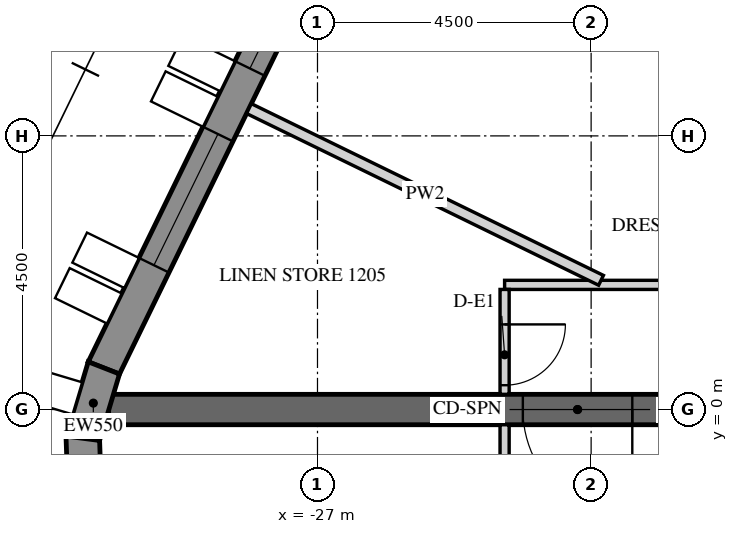
"""IFC4 building model, lengths in metres.
Left out: names, types, materials, properties, quantities, classifications, styles, units other than length and angle.
Written with IfcOpenShell. Run it as: python <this file> out.ifc"""

import sys

from ifc_helpers import new_model, si_unit, direction, frame, frame_2d, origin, place, context, subcontext, project, spatial, polyline, rectangle, outline, extrude, element, fill, save


model = new_model("IFC4")
c1 = context("Model", 3, precision=1e-05, world=origin(), true_north=direction((0.0, 1.0)))
c2 = subcontext(c1, "Body", "Model", "MODEL_VIEW")
j1 = project(units=[si_unit("LENGTHUNIT", "METRE"), si_unit("PLANEANGLEUNIT", "RADIAN")], contexts=[c1])
p1 = place(None, origin())
s1 = spatial("IfcSite", under=j1, at=p1, CompositionType="ELEMENT")
p2 = place(p1, origin())
s2 = spatial("IfcBuilding", under=s1, at=p2, CompositionType="ELEMENT")
p3 = place(p2, frame((0.0, 0.0, 164.4)))
s3 = spatial("IfcBuildingStorey", under=s2, at=p3, CompositionType="ELEMENT", Elevation=164.4)
p4 = place(p3, frame((-18.345, 25.633, -0.15), z_axis=(0.0, 0.0, 1.0), x_axis=(-0.43837181828, -0.898793718791, 0.0)))
e1 = element("IfcWall", 1, at=p4, inside=s3, PredefinedType="SOLIDWALL", context=c2, shape_type="SweptSolid", body=[
    extrude(outline(polyline([(-0.026, -0.275), (27.78, -0.275), (27.735, 0.275), (0.026, 0.275), (-0.026, -0.275)])), origin(), (0.0, 0.0, 1.0), 3.9),
])
p5 = place(p4, frame((1.879, 0.0, 1.05)))
e2 = element("IfcOpeningElement", 2, at=p5, cuts=e1, PredefinedType="OPENING", context=c2, shape_type="SweptSolid", body=[
    extrude(rectangle(XDim=2.4, YDim=2.4, at=frame_2d((1.2, 1.2))), frame((0.0, 0.285, 0.0), z_axis=(0.0, -1.0, 0.0), x_axis=(1.0, 0.0, 0.0)), (0.0, 0.0, 1.0), 0.57),
])
p6 = place(p4, frame((5.479, 0.0, 1.05)))
e3 = element("IfcOpeningElement", 3, at=p6, cuts=e1, PredefinedType="OPENING", context=c2, shape_type="SweptSolid", body=[
    extrude(rectangle(XDim=2.4, YDim=2.4, at=frame_2d((1.2, 1.2))), frame((0.0, 0.285, 0.0), z_axis=(0.0, -1.0, 0.0), x_axis=(1.0, 0.0, 0.0)), (0.0, 0.0, 1.0), 0.57),
])
p7 = place(p4, frame((9.079, 0.0, 1.05)))
e4 = element("IfcOpeningElement", 4, at=p7, cuts=e1, PredefinedType="OPENING", context=c2, shape_type="SweptSolid", body=[
    extrude(rectangle(XDim=2.4, YDim=2.4, at=frame_2d((1.2, 1.2))), frame((0.0, 0.285, 0.0), z_axis=(0.0, -1.0, 0.0), x_axis=(1.0, 0.0, 0.0)), (0.0, 0.0, 1.0), 0.57),
])
p8 = place(p4, frame((12.679, 0.0, 1.05)))
e5 = element("IfcOpeningElement", 5, at=p8, cuts=e1, PredefinedType="OPENING", context=c2, shape_type="SweptSolid", body=[
    extrude(rectangle(XDim=2.4, YDim=2.4, at=frame_2d((1.2, 1.2))), frame((0.0, 0.285, 0.0), z_axis=(0.0, -1.0, 0.0), x_axis=(1.0, 0.0, 0.0)), (0.0, 0.0, 1.0), 0.57),
])
p9 = place(p4, frame((16.279, 0.0, 1.05)))
e6 = element("IfcOpeningElement", 6, at=p9, cuts=e1, PredefinedType="OPENING", context=c2, shape_type="SweptSolid", body=[
    extrude(rectangle(XDim=2.4, YDim=2.4, at=frame_2d((1.2, 1.2))), frame((0.0, 0.285, 0.0), z_axis=(0.0, -1.0, 0.0), x_axis=(1.0, 0.0, 0.0)), (0.0, 0.0, 1.0), 0.57),
])
p10 = place(p4, frame((19.879, 0.0, 1.05)))
e7 = element("IfcOpeningElement", 7, at=p10, cuts=e1, PredefinedType="OPENING", context=c2, shape_type="SweptSolid", body=[
    extrude(rectangle(XDim=2.4, YDim=2.4, at=frame_2d((1.2, 1.2))), frame((0.0, 0.285, 0.0), z_axis=(0.0, -1.0, 0.0), x_axis=(1.0, 0.0, 0.0)), (0.0, 0.0, 1.0), 0.57),
])
p11 = place(p4, frame((23.479, 0.0, 1.05)))
e8 = element("IfcOpeningElement", 8, at=p11, cuts=e1, PredefinedType="OPENING", context=c2, shape_type="SweptSolid", body=[
    extrude(rectangle(XDim=2.4, YDim=2.4, at=frame_2d((1.2, 1.2))), frame((0.0, 0.285, 0.0), z_axis=(0.0, -1.0, 0.0), x_axis=(1.0, 0.0, 0.0)), (0.0, 0.0, 1.0), 0.57),
])
p12 = place(p3, frame((-30.513, 0.684, -0.15), z_axis=(0.0, 0.0, 1.0), x_axis=(-0.286736058109, -0.958009620505, 0.0)))
e9 = element("IfcWall", 9, at=p12, inside=s3, PredefinedType="SOLIDWALL", context=c2, shape_type="SweptSolid", body=[
    extrude(outline(polyline([(-0.022, -0.275), (1.253, -0.275), (1.163, 0.275), (0.022, 0.275), (-0.022, -0.275)])), origin(), (0.0, 0.0, 1.0), 3.9),
])
p13 = place(p3, frame((-30.86, -0.473, -0.15), z_axis=(0.0, 0.0, 1.0), x_axis=(0.03495638276, -0.999388838893, 0.0)))
e10 = element("IfcWall", 10, at=p13, inside=s3, PredefinedType="SOLIDWALL", context=c2, shape_type="SweptSolid", body=[
    extrude(outline(polyline([(-0.045, -0.275), (1.253, -0.275), (1.163, 0.275), (0.045, 0.275), (-0.045, -0.275)])), origin(), (0.0, 0.0, 1.0), 3.9),
])
p14 = place(p3, frame((-15.011, 0.0, -0.15), z_axis=(0.0, 0.0, 1.0), x_axis=(-1.0, 0.0, 0.0)))
e11 = element("IfcWall", 11, at=p14, inside=s3, PredefinedType="SHEAR", context=c2, shape_type="SweptSolid", body=[
    extrude(rectangle(XDim=15.424, YDim=0.5, at=frame_2d((7.712, 0.0))), origin(), (0.0, 0.0, 1.0), 3.9),
])
p15 = place(p14, frame((6.812, 0.0, 0.15)))
e12 = element("IfcOpeningElement", 12, at=p15, cuts=e11, PredefinedType="OPENING", context=c2, shape_type="SweptSolid", body=[
    extrude(rectangle(XDim=1.8, YDim=2.4, at=frame_2d((0.9, 1.2))), frame((0.0, 0.26, 0.0), z_axis=(0.0, -1.0, 0.0), x_axis=(1.0, 0.0, 0.0)), (0.0, 0.0, 1.0), 0.52),
])
p16 = place(p3, frame((-16.137, 2.05, 0.0), z_axis=(0.0, 0.0, 1.0), x_axis=(-1.0, 0.0, 0.0)))
e13 = element("IfcWall", 13, at=p16, inside=s3, PredefinedType="PARTITIONING", context=c2, shape_type="SweptSolid", body=[
    extrude(rectangle(XDim=7.786, YDim=0.15, at=frame_2d((3.893, 0.0))), origin(), (0.0, 0.0, 1.0), 2.988),
])
p17 = place(p3, frame((-23.923, 1.975, 0.0), z_axis=(0.0, 0.0, 1.0), x_axis=(0.0, -1.0, 0.0)))
e14 = element("IfcWall", 14, at=p17, inside=s3, PredefinedType="PARTITIONING", context=c2, shape_type="SweptSolid", body=[
    extrude(rectangle(XDim=1.725, YDim=0.15, at=frame_2d((0.863, 0.0))), origin(), (0.0, 0.0, 1.0), 2.988),
])
p18 = place(p17, frame((0.575, 0.0, 0.0)))
e15 = element("IfcOpeningElement", 15, at=p18, cuts=e14, PredefinedType="OPENING", context=c2, shape_type="SweptSolid", body=[
    extrude(rectangle(XDim=1.0, YDim=2.1, at=frame_2d((0.5, 1.05))), frame((0.0, 0.085, 0.0), z_axis=(0.0, -1.0, 0.0), x_axis=(1.0, 0.0, 0.0)), (0.0, 0.0, 1.0), 0.17),
])
p19 = place(p3, frame((-23.923, -0.25, 0.0), z_axis=(0.0, 0.0, 1.0), x_axis=(0.0, -1.0, 0.0)))
e16 = element("IfcWall", 16, at=p19, inside=s3, PredefinedType="PARTITIONING", context=c2, shape_type="SweptSolid", body=[
    extrude(rectangle(XDim=1.8, YDim=0.15, at=frame_2d((0.9, 0.0))), origin(), (0.0, 0.0, 1.0), 2.988),
])
p20 = place(p3, frame((-28.127, 4.949, 0.0), z_axis=(0.0, 0.0, 1.0), x_axis=(0.898795032868, -0.438369124017, 0.0)))
e17 = element("IfcWall", 17, at=p20, inside=s3, PredefinedType="PARTITIONING", context=c2, shape_type="SweptSolid", body=[
    extrude(rectangle(XDim=6.442, YDim=0.18, at=frame_2d((3.221, 0.0))), origin(), (0.0, 0.0, 1.0), 2.988),
])
p21 = place(p10, frame((0.0, 0.205, 0.0)))
e18 = element("IfcWindow", 18, at=p21, inside=s3, PartitioningType="DOUBLE_PANEL_VERTICAL", PredefinedType="WINDOW", context=c2, shape_type="SweptSolid", body=[
    extrude(rectangle(XDim=2.4, YDim=2.4, at=frame_2d((1.2, 1.2))), frame((0.0, 0.03, 0.0), z_axis=(0.0, -1.0, 0.0), x_axis=(1.0, 0.0, 0.0)), (0.0, 0.0, 1.0), 0.06),
])
fill(e7, e18)
p22 = place(p11, frame((0.0, 0.205, 0.0)))
e19 = element("IfcWindow", 19, at=p22, inside=s3, PartitioningType="DOUBLE_PANEL_VERTICAL", PredefinedType="WINDOW", context=c2, shape_type="SweptSolid", body=[
    extrude(rectangle(XDim=2.4, YDim=2.4, at=frame_2d((1.2, 1.2))), frame((0.0, 0.03, 0.0), z_axis=(0.0, -1.0, 0.0), x_axis=(1.0, 0.0, 0.0)), (0.0, 0.0, 1.0), 0.06),
])
fill(e8, e19)
p23 = place(p15, origin())
e20 = element("IfcDoor", 20, at=p23, inside=s3, OperationType="DOUBLE_DOOR_SINGLE_SWING", PredefinedType="DOOR", context=c2, shape_type="SweptSolid", body=[
    extrude(rectangle(XDim=1.8, YDim=2.4, at=frame_2d((0.9, 1.2))), frame((0.0, 0.025, 0.0), z_axis=(0.0, -1.0, 0.0), x_axis=(1.0, 0.0, 0.0)), (0.0, 0.0, 1.0), 0.05),
])
fill(e12, e20)
p24 = place(p18, origin())
e21 = element("IfcDoor", 21, at=p24, inside=s3, OperationType="SINGLE_SWING_LEFT", PredefinedType="DOOR", context=c2, shape_type="SweptSolid", body=[
    extrude(rectangle(XDim=1.0, YDim=2.1, at=frame_2d((0.5, 1.05))), frame((0.0, 0.025, 0.0), z_axis=(0.0, -1.0, 0.0), x_axis=(1.0, 0.0, 0.0)), (0.0, 0.0, 1.0), 0.05),
])
fill(e15, e21)
save(model, sys.argv[1])
